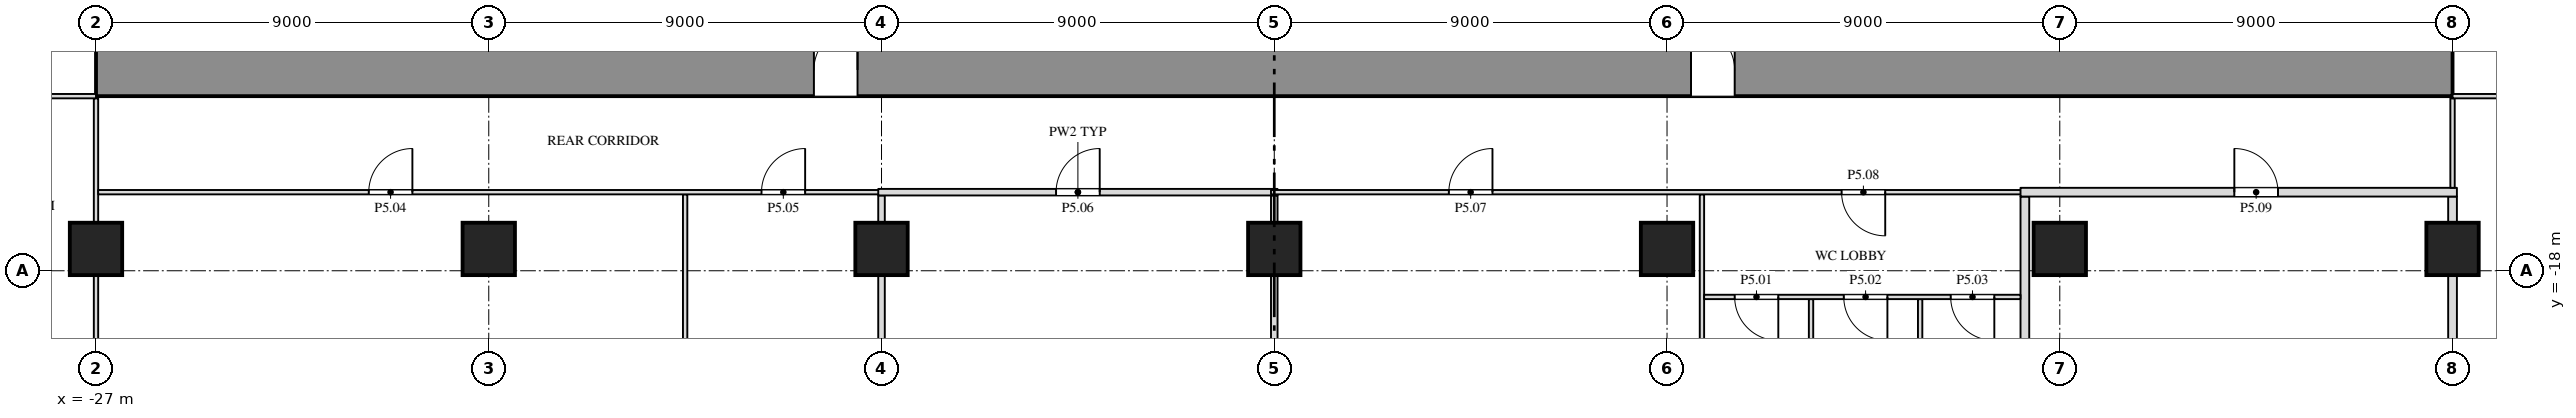
"""IFC4 building model, lengths in metres.
Left out: names, types, materials, properties, quantities, classifications, styles, units other than length and angle.
Written with IfcOpenShell. Run it as: python <this file> out.ifc"""

import sys

from ifc_helpers import new_model, si_unit, direction, frame, frame_2d, origin, origin_2d, place, context, subcontext, project, spatial, rectangle, extrude, element, fill, save


model = new_model("IFC4")
c1 = context("Model", 3, precision=1e-05, world=origin(), true_north=direction((0.0, 1.0)))
c2 = subcontext(c1, "Body", "Model", "MODEL_VIEW")
j1 = project(units=[si_unit("LENGTHUNIT", "METRE"), si_unit("PLANEANGLEUNIT", "RADIAN")], contexts=[c1])
p1 = place(None, origin())
s1 = spatial("IfcSite", under=j1, at=p1, CompositionType="ELEMENT")
p2 = place(p1, origin())
s2 = spatial("IfcBuilding", under=s1, at=p2, CompositionType="ELEMENT")
p3 = place(p2, frame((0.0, 0.0, 33.0)))
s3 = spatial("IfcBuildingStorey", under=s2, at=p3, CompositionType="ELEMENT", Elevation=33.0)
for number, where, z_axis, x_axis in (
    (1, (-27.0, -17.5, 0.0), (0.0, 0.0, 1.0), (1.0, 0.0, 0.0)),
    (2, (-18.0, -17.5, 0.0), (0.0, 0.0, 1.0), (1.0, 0.0, 0.0)),
    (3, (-9.0, -17.5, 0.0), (0.0, 0.0, 1.0), (1.0, 0.0, 0.0)),
    (4, (0.0, -17.5, 0.0), (0.0, 0.0, 1.0), (1.0, 0.0, 0.0)),
    (5, (9.0, -17.5, 0.0), (0.0, 0.0, 1.0), (1.0, 0.0, 0.0)),
    (6, (18.0, -17.5, 0.0), (0.0, 0.0, 1.0), (1.0, 0.0, 0.0)),
    (7, (27.0, -17.5, 0.0), (0.0, 0.0, 1.0), (1.0, 0.0, 0.0)),
):
    element("IfcColumn", number, at=place(p3, frame(where, z_axis=z_axis, x_axis=x_axis)), inside=s3, PredefinedType="COLUMN", context=c2, shape_type="SweptSolid", body=[
        extrude(rectangle(XDim=1.2, YDim=1.2, at=origin_2d()), origin(), (0.0, 0.0, 1.0), 6.0),
    ])
p4 = place(p3, frame((-27.0, -13.4, 0.0), z_axis=(0.0, 0.0, 1.0), x_axis=(1.0, 0.0, 0.0)))
e8 = element("IfcWall", 8, at=p4, inside=s3, PredefinedType="SHEAR", context=c2, shape_type="SweptSolid", body=[
    extrude(rectangle(XDim=54.0, YDim=1.2, at=frame_2d((27.0, 0.0))), origin(), (0.0, 0.0, 1.0), 5.75),
])
p5 = place(p4, frame((16.45, 0.0, 0.0)))
e9 = element("IfcOpeningElement", 9, at=p5, cuts=e8, PredefinedType="OPENING", context=c2, shape_type="SweptSolid", body=[
    extrude(rectangle(XDim=1.0, YDim=2.1, at=frame_2d((0.5, 1.05))), frame((0.0, 0.612, 0.0), z_axis=(0.0, -1.0, 0.0), x_axis=(1.0, 0.0, 0.0)), (0.0, 0.0, 1.0), 1.224),
])
p6 = place(p4, frame((36.55, 0.0, 0.0)))
e10 = element("IfcOpeningElement", 10, at=p6, cuts=e8, PredefinedType="OPENING", context=c2, shape_type="SweptSolid", body=[
    extrude(rectangle(XDim=1.0, YDim=2.1, at=frame_2d((0.5, 1.05))), frame((0.0, 0.612, 0.0), z_axis=(0.0, -1.0, 0.0), x_axis=(1.0, 0.0, 0.0)), (0.0, 0.0, 1.0), 1.224),
])
p7 = place(p3, frame((-27.0, -25.9, 0.0), z_axis=(0.0, 0.0, 1.0), x_axis=(0.0, 1.0, 0.0)))
e11 = element("IfcWall", 11, at=p7, inside=s3, PredefinedType="PARTITIONING", context=c2, shape_type="SweptSolid", body=[
    extrude(rectangle(XDim=7.8, YDim=0.1, at=frame_2d((3.9, 0.0))), origin(), (0.0, 0.0, 1.0), 5.138),
])
p8 = place(p3, frame((-27.0, -16.9, 0.0), z_axis=(0.0, 0.0, 1.0), x_axis=(0.0, 1.0, 0.0)))
e12 = element("IfcWall", 12, at=p8, inside=s3, PredefinedType="PARTITIONING", context=c2, shape_type="SweptSolid", body=[
    extrude(rectangle(XDim=2.85, YDim=0.1, at=frame_2d((1.425, 0.0))), origin(), (0.0, 0.0, 1.0), 5.138),
])
p9 = place(p3, frame((-13.5, -26.615, 0.0), z_axis=(0.0, 0.0, 1.0), x_axis=(0.0, 1.0, 0.0)))
e13 = element("IfcWall", 13, at=p9, inside=s3, PredefinedType="PARTITIONING", context=c2, shape_type="SweptSolid", body=[
    extrude(rectangle(XDim=10.365, YDim=0.1, at=frame_2d((5.182, 0.0))), origin(), (0.0, 0.0, 1.0), 5.138),
])
p10 = place(p3, frame((-9.0, -25.9, 0.0), z_axis=(0.0, 0.0, 1.0), x_axis=(0.0, 1.0, 0.0)))
e14 = element("IfcWall", 14, at=p10, inside=s3, PredefinedType="PARTITIONING", context=c2, shape_type="SweptSolid", body=[
    extrude(rectangle(XDim=7.8, YDim=0.15, at=frame_2d((3.9, 0.0))), origin(), (0.0, 0.0, 1.0), 5.138),
])
p11 = place(p3, frame((-9.0, -16.9, 0.0), z_axis=(0.0, 0.0, 1.0), x_axis=(0.0, 1.0, 0.0)))
e15 = element("IfcWall", 15, at=p11, inside=s3, PredefinedType="PARTITIONING", context=c2, shape_type="SweptSolid", body=[
    extrude(rectangle(XDim=0.625, YDim=0.15, at=frame_2d((0.312, 0.0))), origin(), (0.0, 0.0, 1.0), 5.75),
])
p12 = place(p3, frame((0.0, -25.9, 0.0), z_axis=(0.0, 0.0, 1.0), x_axis=(0.0, 1.0, 0.0)))
e16 = element("IfcWall", 16, at=p12, inside=s3, PredefinedType="PARTITIONING", context=c2, shape_type="SweptSolid", body=[
    extrude(rectangle(XDim=7.8, YDim=0.15, at=frame_2d((3.9, 0.0))), origin(), (0.0, 0.0, 1.0), 5.138),
])
p13 = place(p3, frame((0.0, -16.9, 0.0), z_axis=(0.0, 0.0, 1.0), x_axis=(0.0, 1.0, 0.0)))
e17 = element("IfcWall", 17, at=p13, inside=s3, PredefinedType="PARTITIONING", context=c2, shape_type="SweptSolid", body=[
    extrude(rectangle(XDim=0.625, YDim=0.15, at=frame_2d((0.312, 0.0))), origin(), (0.0, 0.0, 1.0), 5.75),
])
p14 = place(p3, frame((9.8, -27.2, 0.0), z_axis=(0.0, 0.0, 1.0), x_axis=(0.0, 1.0, 0.0)))
e18 = element("IfcWall", 18, at=p14, inside=s3, PredefinedType="PARTITIONING", context=c2, shape_type="SweptSolid", body=[
    extrude(rectangle(XDim=10.95, YDim=0.1, at=frame_2d((5.475, 0.0))), origin(), (0.0, 0.0, 1.0), 5.75),
])
for number, where, z_axis, x_axis in (
    (19, (12.3, -27.2, 0.0), (0.0, 0.0, 1.0), (0.0, 1.0, 0.0)),
    (20, (14.8, -27.2, 0.0), (0.0, 0.0, 1.0), (0.0, 1.0, 0.0)),
):
    element("IfcWall", number, at=place(p3, frame(where, z_axis=z_axis, x_axis=x_axis)), inside=s3, PredefinedType="PARTITIONING", context=c2, shape_type="SweptSolid", body=[
        extrude(rectangle(XDim=8.55, YDim=0.1, at=frame_2d((4.275, 0.0))), origin(), (0.0, 0.0, 1.0), 5.75),
    ])
p15 = place(p3, frame((17.2, -27.2, 0.0), z_axis=(0.0, 0.0, 1.0), x_axis=(0.0, 1.0, 0.0)))
e21 = element("IfcWall", 21, at=p15, inside=s3, PredefinedType="PARTITIONING", context=c2, shape_type="SweptSolid", body=[
    extrude(rectangle(XDim=10.9, YDim=0.2, at=frame_2d((5.45, 0.0))), origin(), (0.0, 0.0, 1.0), 5.75),
])
p16 = place(p3, frame((27.0, -25.9, 0.0), z_axis=(0.0, 0.0, 1.0), x_axis=(0.0, 1.0, 0.0)))
e22 = element("IfcWall", 22, at=p16, inside=s3, PredefinedType="PARTITIONING", context=c2, shape_type="SweptSolid", body=[
    extrude(rectangle(XDim=7.8, YDim=0.2, at=frame_2d((3.9, 0.0))), origin(), (0.0, 0.0, 1.0), 5.138),
])
p17 = place(p3, frame((27.0, -16.9, 0.0), z_axis=(0.0, 0.0, 1.0), x_axis=(0.0, 1.0, 0.0)))
e23 = element("IfcWall", 23, at=p17, inside=s3, PredefinedType="PARTITIONING", context=c2, shape_type="SweptSolid", body=[
    extrude(rectangle(XDim=0.6, YDim=0.2, at=frame_2d((0.3, 0.0))), origin(), (0.0, 0.0, 1.0), 5.138),
])
p18 = place(p3, frame((9.85, -18.6, 0.0), z_axis=(0.0, 0.0, 1.0), x_axis=(1.0, 0.0, 0.0)))
e24 = element("IfcWall", 24, at=p18, inside=s3, PredefinedType="PARTITIONING", context=c2, shape_type="SweptSolid", body=[
    extrude(rectangle(XDim=7.25, YDim=0.1, at=frame_2d((3.625, 0.0))), origin(), (0.0, 0.0, 1.0), 5.75),
])
p19 = place(p18, frame((0.7, 0.0, 0.0)))
e25 = element("IfcOpeningElement", 25, at=p19, cuts=e24, PredefinedType="OPENING", context=c2, shape_type="SweptSolid", body=[
    extrude(rectangle(XDim=1.0, YDim=2.1, at=frame_2d((0.5, 1.05))), frame((0.0, 0.062, 0.0), z_axis=(0.0, -1.0, 0.0), x_axis=(1.0, 0.0, 0.0)), (0.0, 0.0, 1.0), 0.124),
])
p20 = place(p18, frame((3.2, 0.0, 0.0)))
e26 = element("IfcOpeningElement", 26, at=p20, cuts=e24, PredefinedType="OPENING", context=c2, shape_type="SweptSolid", body=[
    extrude(rectangle(XDim=1.0, YDim=2.1, at=frame_2d((0.5, 1.05))), frame((0.0, 0.062, 0.0), z_axis=(0.0, -1.0, 0.0), x_axis=(1.0, 0.0, 0.0)), (0.0, 0.0, 1.0), 0.124),
])
p21 = place(p18, frame((5.65, 0.0, 0.0)))
e27 = element("IfcOpeningElement", 27, at=p21, cuts=e24, PredefinedType="OPENING", context=c2, shape_type="SweptSolid", body=[
    extrude(rectangle(XDim=1.0, YDim=2.1, at=frame_2d((0.5, 1.05))), frame((0.0, 0.062, 0.0), z_axis=(0.0, -1.0, 0.0), x_axis=(1.0, 0.0, 0.0)), (0.0, 0.0, 1.0), 0.124),
])
p22 = place(p3, frame((-26.95, -16.2, 0.0), z_axis=(0.0, 0.0, 1.0), x_axis=(1.0, 0.0, 0.0)))
e28 = element("IfcWall", 28, at=p22, inside=s3, PredefinedType="PARTITIONING", context=c2, shape_type="SweptSolid", body=[
    extrude(rectangle(XDim=18.025, YDim=0.1, at=frame_2d((9.012, 0.0))), origin(), (0.0, 0.0, 1.0), 5.75),
])
p23 = place(p22, frame((6.2, 0.0, 0.0)))
e29 = element("IfcOpeningElement", 29, at=p23, cuts=e28, PredefinedType="OPENING", context=c2, shape_type="SweptSolid", body=[
    extrude(rectangle(XDim=1.0, YDim=2.1, at=frame_2d((0.5, 1.05))), frame((0.0, 0.062, 0.0), z_axis=(0.0, -1.0, 0.0), x_axis=(1.0, 0.0, 0.0)), (0.0, 0.0, 1.0), 0.124),
])
p24 = place(p22, frame((15.2, 0.0, 0.0)))
e30 = element("IfcOpeningElement", 30, at=p24, cuts=e28, PredefinedType="OPENING", context=c2, shape_type="SweptSolid", body=[
    extrude(rectangle(XDim=1.0, YDim=2.1, at=frame_2d((0.5, 1.05))), frame((0.0, 0.062, 0.0), z_axis=(0.0, -1.0, 0.0), x_axis=(1.0, 0.0, 0.0)), (0.0, 0.0, 1.0), 0.124),
])
p25 = place(p3, frame((-9.075, -16.2, 0.0), z_axis=(0.0, 0.0, 1.0), x_axis=(1.0, 0.0, 0.0)))
e31 = element("IfcWall", 31, at=p25, inside=s3, PredefinedType="PARTITIONING", context=c2, shape_type="SweptSolid", body=[
    extrude(rectangle(XDim=9.15, YDim=0.15, at=frame_2d((4.575, 0.0))), origin(), (0.0, 0.0, 1.0), 5.75),
])
p26 = place(p25, frame((4.075, 0.0, 0.0)))
e32 = element("IfcOpeningElement", 32, at=p26, cuts=e31, PredefinedType="OPENING", context=c2, shape_type="SweptSolid", body=[
    extrude(rectangle(XDim=1.0, YDim=2.1, at=frame_2d((0.5, 1.05))), frame((0.0, 0.087, 0.0), z_axis=(0.0, -1.0, 0.0), x_axis=(1.0, 0.0, 0.0)), (0.0, 0.0, 1.0), 0.174),
])
p27 = place(p3, frame((-0.075, -16.2, 0.0), z_axis=(0.0, 0.0, 1.0), x_axis=(1.0, 0.0, 0.0)))
e33 = element("IfcWall", 33, at=p27, inside=s3, PredefinedType="PARTITIONING", context=c2, shape_type="SweptSolid", body=[
    extrude(rectangle(XDim=17.375, YDim=0.1, at=frame_2d((8.688, 0.0))), origin(), (0.0, 0.0, 1.0), 5.75),
])
p28 = place(p27, frame((4.075, 0.0, 0.0)))
e34 = element("IfcOpeningElement", 34, at=p28, cuts=e33, PredefinedType="OPENING", context=c2, shape_type="SweptSolid", body=[
    extrude(rectangle(XDim=1.0, YDim=2.1, at=frame_2d((0.5, 1.05))), frame((0.0, 0.062, 0.0), z_axis=(0.0, -1.0, 0.0), x_axis=(1.0, 0.0, 0.0)), (0.0, 0.0, 1.0), 0.124),
])
p29 = place(p27, frame((13.075, 0.0, 0.0)))
e35 = element("IfcOpeningElement", 35, at=p29, cuts=e33, PredefinedType="OPENING", context=c2, shape_type="SweptSolid", body=[
    extrude(rectangle(XDim=1.0, YDim=2.1, at=frame_2d((0.5, 1.05))), frame((0.0, 0.062, 0.0), z_axis=(0.0, -1.0, 0.0), x_axis=(1.0, 0.0, 0.0)), (0.0, 0.0, 1.0), 0.124),
])
p30 = place(p3, frame((17.1, -16.2, 0.0), z_axis=(0.0, 0.0, 1.0), x_axis=(1.0, 0.0, 0.0)))
e36 = element("IfcWall", 36, at=p30, inside=s3, PredefinedType="PARTITIONING", context=c2, shape_type="SweptSolid", body=[
    extrude(rectangle(XDim=10.0, YDim=0.2, at=frame_2d((5.0, 0.0))), origin(), (0.0, 0.0, 1.0), 5.75),
])
p31 = place(p30, frame((4.9, 0.0, 0.0)))
e37 = element("IfcOpeningElement", 37, at=p31, cuts=e36, PredefinedType="OPENING", context=c2, shape_type="SweptSolid", body=[
    extrude(rectangle(XDim=1.0, YDim=2.1, at=frame_2d((0.5, 1.05))), frame((0.0, 0.112, 0.0), z_axis=(0.0, -1.0, 0.0), x_axis=(1.0, 0.0, 0.0)), (0.0, 0.0, 1.0), 0.224),
])
p32 = place(p3, frame((27.0, -16.1, 0.0), z_axis=(0.0, 0.0, 1.0), x_axis=(0.0, 1.0, 0.0)))
e38 = element("IfcWall", 38, at=p32, inside=s3, PredefinedType="PARTITIONING", context=c2, shape_type="SweptSolid", body=[
    extrude(rectangle(XDim=2.05, YDim=0.1, at=frame_2d((1.025, 0.0))), origin(), (0.0, 0.0, 1.0), 5.138),
])
p33 = place(p3, frame((-38.2, -14.0, 0.0), z_axis=(0.0, 0.0, 1.0), x_axis=(1.0, 0.0, 0.0)))
e39 = element("IfcWall", 39, at=p33, inside=s3, PredefinedType="PARTITIONING", context=c2, shape_type="SweptSolid", body=[
    extrude(rectangle(XDim=11.2, YDim=0.1, at=frame_2d((5.6, 0.0))), origin(), (0.0, 0.0, 1.0), 5.75),
])
p34 = place(p33, frame((1.7, 0.0, 0.0)))
e40 = element("IfcOpeningElement", 40, at=p34, cuts=e39, PredefinedType="OPENING", context=c2, shape_type="SweptSolid", body=[
    extrude(rectangle(XDim=1.0, YDim=2.1, at=frame_2d((0.5, 1.05))), frame((0.0, 0.062, 0.0), z_axis=(0.0, -1.0, 0.0), x_axis=(1.0, 0.0, 0.0)), (0.0, 0.0, 1.0), 0.124),
])
p35 = place(p33, frame((7.7, 0.0, 0.0)))
e41 = element("IfcOpeningElement", 41, at=p35, cuts=e39, PredefinedType="OPENING", context=c2, shape_type="SweptSolid", body=[
    extrude(rectangle(XDim=1.0, YDim=2.1, at=frame_2d((0.5, 1.05))), frame((0.0, 0.062, 0.0), z_axis=(0.0, -1.0, 0.0), x_axis=(1.0, 0.0, 0.0)), (0.0, 0.0, 1.0), 0.124),
])
p36 = place(p3, frame((27.0, -14.0, 0.0), z_axis=(0.0, 0.0, 1.0), x_axis=(1.0, 0.0, 0.0)))
e42 = element("IfcWall", 42, at=p36, inside=s3, PredefinedType="PARTITIONING", context=c2, shape_type="SweptSolid", body=[
    extrude(rectangle(XDim=9.1, YDim=0.1, at=frame_2d((4.55, 0.0))), origin(), (0.0, 0.0, 1.0), 5.75),
])
p37 = place(p36, frame((2.0, 0.0, 0.0)))
e43 = element("IfcOpeningElement", 43, at=p37, cuts=e42, PredefinedType="OPENING", context=c2, shape_type="SweptSolid", body=[
    extrude(rectangle(XDim=1.0, YDim=2.1, at=frame_2d((0.5, 1.05))), frame((0.0, 0.062, 0.0), z_axis=(0.0, -1.0, 0.0), x_axis=(1.0, 0.0, 0.0)), (0.0, 0.0, 1.0), 0.124),
])
p38 = place(p19, origin())
e44 = element("IfcDoor", 44, at=p38, inside=s3, OperationType="SINGLE_SWING_LEFT", PredefinedType="DOOR", context=c2, shape_type="SweptSolid", body=[
    extrude(rectangle(XDim=1.0, YDim=2.1, at=frame_2d((0.5, 1.05))), frame((0.0, 0.025, 0.0), z_axis=(0.0, -1.0, 0.0), x_axis=(1.0, 0.0, 0.0)), (0.0, 0.0, 1.0), 0.05),
])
fill(e25, e44)
p39 = place(p20, origin())
e45 = element("IfcDoor", 45, at=p39, inside=s3, OperationType="SINGLE_SWING_LEFT", PredefinedType="DOOR", context=c2, shape_type="SweptSolid", body=[
    extrude(rectangle(XDim=1.0, YDim=2.1, at=frame_2d((0.5, 1.05))), frame((0.0, 0.025, 0.0), z_axis=(0.0, -1.0, 0.0), x_axis=(1.0, 0.0, 0.0)), (0.0, 0.0, 1.0), 0.05),
])
fill(e26, e45)
p40 = place(p21, origin())
e46 = element("IfcDoor", 46, at=p40, inside=s3, OperationType="SINGLE_SWING_LEFT", PredefinedType="DOOR", context=c2, shape_type="SweptSolid", body=[
    extrude(rectangle(XDim=1.0, YDim=2.1, at=frame_2d((0.5, 1.05))), frame((0.0, 0.025, 0.0), z_axis=(0.0, -1.0, 0.0), x_axis=(1.0, 0.0, 0.0)), (0.0, 0.0, 1.0), 0.05),
])
fill(e27, e46)
p41 = place(p23, origin())
e47 = element("IfcDoor", 47, at=p41, inside=s3, OperationType="SINGLE_SWING_RIGHT", PredefinedType="DOOR", context=c2, shape_type="SweptSolid", body=[
    extrude(rectangle(XDim=1.0, YDim=2.1, at=frame_2d((0.5, 1.05))), frame((0.0, 0.025, 0.0), z_axis=(0.0, -1.0, 0.0), x_axis=(1.0, 0.0, 0.0)), (0.0, 0.0, 1.0), 0.05),
])
fill(e29, e47)
p42 = place(p24, origin())
e48 = element("IfcDoor", 48, at=p42, inside=s3, OperationType="SINGLE_SWING_RIGHT", PredefinedType="DOOR", context=c2, shape_type="SweptSolid", body=[
    extrude(rectangle(XDim=1.0, YDim=2.1, at=frame_2d((0.5, 1.05))), frame((0.0, 0.025, 0.0), z_axis=(0.0, -1.0, 0.0), x_axis=(1.0, 0.0, 0.0)), (0.0, 0.0, 1.0), 0.05),
])
fill(e30, e48)
p43 = place(p26, origin())
e49 = element("IfcDoor", 49, at=p43, inside=s3, OperationType="SINGLE_SWING_RIGHT", PredefinedType="DOOR", context=c2, shape_type="SweptSolid", body=[
    extrude(rectangle(XDim=1.0, YDim=2.1, at=frame_2d((0.5, 1.05))), frame((0.0, 0.025, 0.0), z_axis=(0.0, -1.0, 0.0), x_axis=(1.0, 0.0, 0.0)), (0.0, 0.0, 1.0), 0.05),
])
fill(e32, e49)
p44 = place(p28, origin())
e50 = element("IfcDoor", 50, at=p44, inside=s3, OperationType="SINGLE_SWING_RIGHT", PredefinedType="DOOR", context=c2, shape_type="SweptSolid", body=[
    extrude(rectangle(XDim=1.0, YDim=2.1, at=frame_2d((0.5, 1.05))), frame((0.0, 0.025, 0.0), z_axis=(0.0, -1.0, 0.0), x_axis=(1.0, 0.0, 0.0)), (0.0, 0.0, 1.0), 0.05),
])
fill(e34, e50)
p45 = place(p29, origin())
e51 = element("IfcDoor", 51, at=p45, inside=s3, OperationType="SINGLE_SWING_LEFT", PredefinedType="DOOR", context=c2, shape_type="SweptSolid", body=[
    extrude(rectangle(XDim=1.0, YDim=2.1, at=frame_2d((0.5, 1.05))), frame((0.0, 0.025, 0.0), z_axis=(0.0, -1.0, 0.0), x_axis=(1.0, 0.0, 0.0)), (0.0, 0.0, 1.0), 0.05),
])
fill(e35, e51)
p46 = place(p31, origin())
e52 = element("IfcDoor", 52, at=p46, inside=s3, OperationType="SINGLE_SWING_LEFT", PredefinedType="DOOR", context=c2, shape_type="SweptSolid", body=[
    extrude(rectangle(XDim=1.0, YDim=2.1, at=frame_2d((0.5, 1.05))), frame((0.0, 0.025, 0.0), z_axis=(0.0, -1.0, 0.0), x_axis=(1.0, 0.0, 0.0)), (0.0, 0.0, 1.0), 0.05),
])
fill(e37, e52)
p47 = place(p5, origin())
e53 = element("IfcDoor", 53, at=p47, inside=s3, OperationType="SINGLE_SWING_RIGHT", PredefinedType="DOOR", context=c2, shape_type="SweptSolid", body=[
    extrude(rectangle(XDim=1.0, YDim=2.1, at=frame_2d((0.5, 1.05))), frame((0.0, 0.025, 0.0), z_axis=(0.0, -1.0, 0.0), x_axis=(1.0, 0.0, 0.0)), (0.0, 0.0, 1.0), 0.05),
])
fill(e9, e53)
p48 = place(p6, origin())
e54 = element("IfcDoor", 54, at=p48, inside=s3, OperationType="SINGLE_SWING_LEFT", PredefinedType="DOOR", context=c2, shape_type="SweptSolid", body=[
    extrude(rectangle(XDim=1.0, YDim=2.1, at=frame_2d((0.5, 1.05))), frame((0.0, 0.025, 0.0), z_axis=(0.0, -1.0, 0.0), x_axis=(1.0, 0.0, 0.0)), (0.0, 0.0, 1.0), 0.05),
])
fill(e10, e54)
save(model, sys.argv[1])
